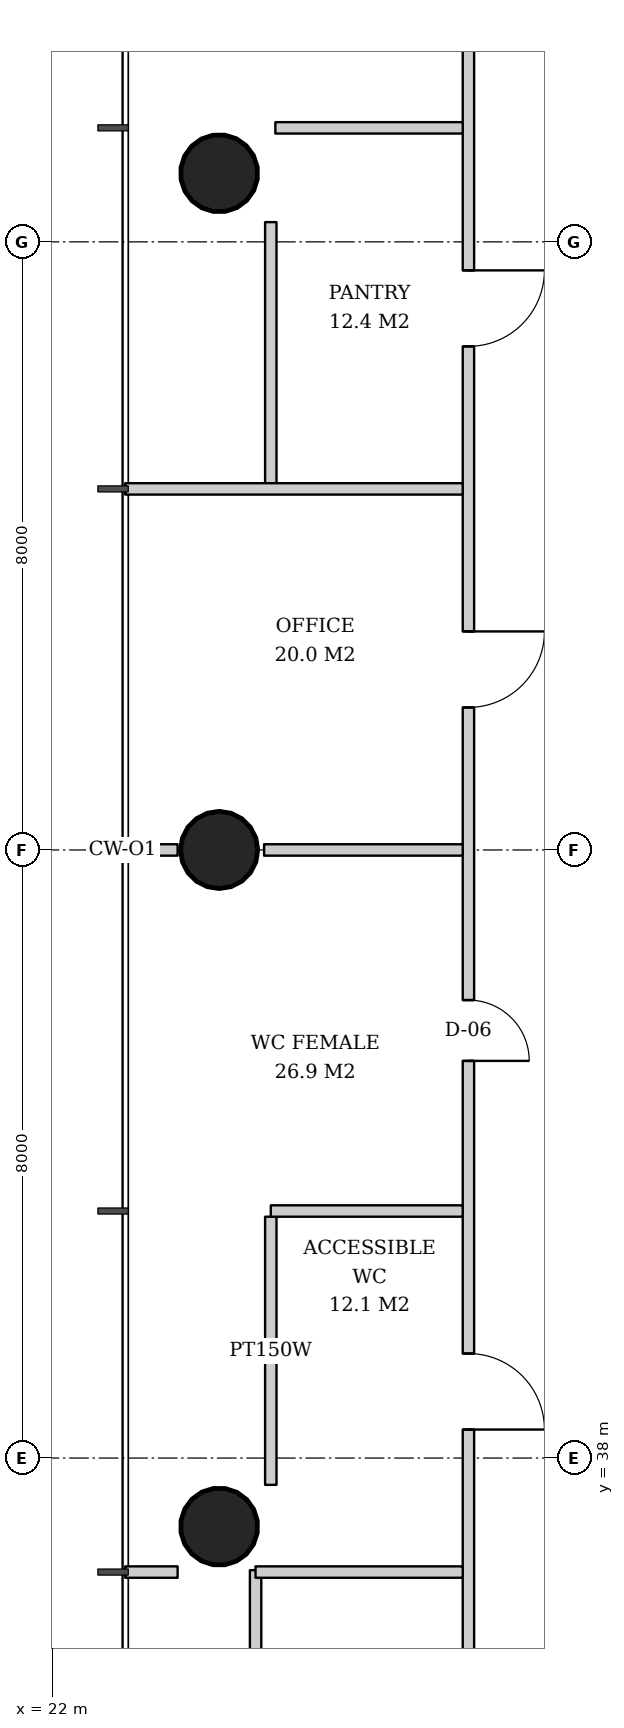
"""IFC4 building model, lengths in metres.
Left out: names, types, materials, properties, quantities, classifications, styles, units other than length and angle.
Written with IfcOpenShell. Run it as: python <this file> out.ifc"""

import sys

from ifc_helpers import new_model, si_unit, direction, frame, frame_2d, origin, origin_2d, place, context, subcontext, project, spatial, rectangle, hollow_circle, extrude, element, fill, save


model = new_model("IFC4")
c1 = context("Model", 3, precision=1e-05, world=origin(), true_north=direction((0.0, 1.0)))
c2 = subcontext(c1, "Body", "Model", "MODEL_VIEW")
j1 = project(units=[si_unit("LENGTHUNIT", "METRE"), si_unit("PLANEANGLEUNIT", "RADIAN")], contexts=[c1])
p1 = place(None, origin())
s1 = spatial("IfcSite", under=j1, at=p1, CompositionType="ELEMENT")
p2 = place(p1, origin())
s2 = spatial("IfcBuilding", under=s1, at=p2, CompositionType="ELEMENT")
p3 = place(p2, frame((0.0, 0.0, 119.8)))
s3 = spatial("IfcBuildingStorey", under=s2, at=p3, CompositionType="ELEMENT", Elevation=119.8)
p4 = place(p3, frame((24.157, 54.921, 0.0), z_axis=(0.031910269556, -0.015987237665, 0.999362868496), x_axis=(0.447933021895, 0.894067115991, 0.0)))
e1 = element("IfcColumn", 1, at=p4, inside=s3, PredefinedType="COLUMN", context=c2, shape_type="SweptSolid", body=[
    extrude(hollow_circle(Radius=0.508, WallThickness=0.04, at=origin_2d()), origin(), (0.0, 0.0, 1.0), 3.802),
])
p5 = place(p3, frame((24.157, 46.0, 0.0), z_axis=(0.031914348339, 0.0, 0.999490607445), x_axis=(0.0, 1.0, 0.0)))
e2 = element("IfcColumn", 2, at=p5, inside=s3, PredefinedType="COLUMN", context=c2, shape_type="SweptSolid", body=[
    extrude(hollow_circle(Radius=0.508, WallThickness=0.04, at=origin_2d()), origin(), (0.0, 0.0, 1.0), 3.802),
])
p6 = place(p3, frame((24.157, 37.079, 0.0), z_axis=(0.031910269556, 0.015987237665, 0.999362868496), x_axis=(-0.447933021895, 0.894067115991, 0.0)))
e3 = element("IfcColumn", 3, at=p6, inside=s3, PredefinedType="COLUMN", context=c2, shape_type="SweptSolid", body=[
    extrude(hollow_circle(Radius=0.508, WallThickness=0.04, at=origin_2d()), origin(), (0.0, 0.0, 1.0), 3.802),
])
p7 = place(p3, frame((24.875, 54.26, 0.0), z_axis=(0.0, 0.0, 1.0), x_axis=(0.0, -1.0, 0.0)))
e4 = element("IfcWall", 4, at=p7, inside=s3, PredefinedType="PARTITIONING", context=c2, shape_type="SweptSolid", body=[
    extrude(rectangle(XDim=3.435, YDim=0.15, at=frame_2d((1.717, 0.0))), origin(), (0.0, 0.0, 1.0), 3.62),
])
p8 = place(p3, frame((24.875, 41.175, 0.0), z_axis=(0.0, 0.0, 1.0), x_axis=(0.0, -1.0, 0.0)))
e5 = element("IfcWall", 5, at=p8, inside=s3, PredefinedType="PARTITIONING", context=c2, shape_type="SweptSolid", body=[
    extrude(rectangle(XDim=3.528, YDim=0.15, at=frame_2d((1.764, 0.0))), origin(), (0.0, 0.0, 1.0), 2.806),
])
p9 = place(p3, frame((24.675, 36.525, 0.0), z_axis=(0.0, 0.0, 1.0), x_axis=(0.0, -1.0, 0.0)))
e6 = element("IfcWall", 6, at=p9, inside=s3, PredefinedType="PARTITIONING", context=c2, shape_type="SweptSolid", body=[
    extrude(rectangle(XDim=4.7, YDim=0.15, at=frame_2d((2.35, 0.0))), origin(), (0.0, 0.0, 1.0), 2.806),
])
p10 = place(p3, frame((27.475, 61.612, 0.0), z_axis=(0.0, 0.0, 1.0), x_axis=(0.0, -1.0, 0.0)))
e7 = element("IfcWall", 7, at=p10, inside=s3, PredefinedType="PARTITIONING", context=c2, shape_type="SweptSolid", body=[
    extrude(rectangle(XDim=31.223, YDim=0.15, at=frame_2d((15.612, 0.0))), origin(), (0.0, 0.0, 1.0), 2.72),
])
p11 = place(p10, frame((3.237, 0.0, 0.0)))
e8 = element("IfcOpeningElement", 8, at=p11, cuts=e7, PredefinedType="OPENING", context=c2, shape_type="SweptSolid", body=[
    extrude(rectangle(XDim=1.0, YDim=2.1, at=frame_2d((0.5, 1.05))), frame((0.0, 0.085, 0.0), z_axis=(0.0, -1.0, 0.0), x_axis=(1.0, 0.0, 0.0)), (0.0, 0.0, 1.0), 0.17),
])
p12 = place(p10, frame((7.987, 0.0, 0.0)))
e9 = element("IfcOpeningElement", 9, at=p12, cuts=e7, PredefinedType="OPENING", context=c2, shape_type="SweptSolid", body=[
    extrude(rectangle(XDim=1.0, YDim=2.1, at=frame_2d((0.5, 1.05))), frame((0.0, 0.085, 0.0), z_axis=(0.0, -1.0, 0.0), x_axis=(1.0, 0.0, 0.0)), (0.0, 0.0, 1.0), 0.17),
])
p13 = place(p10, frame((12.737, 0.0, 0.0)))
e10 = element("IfcOpeningElement", 10, at=p13, cuts=e7, PredefinedType="OPENING", context=c2, shape_type="SweptSolid", body=[
    extrude(rectangle(XDim=1.0, YDim=2.1, at=frame_2d((0.5, 1.05))), frame((0.0, 0.085, 0.0), z_axis=(0.0, -1.0, 0.0), x_axis=(1.0, 0.0, 0.0)), (0.0, 0.0, 1.0), 0.17),
])
p14 = place(p10, frame((17.586, 0.0, 0.0)))
e11 = element("IfcOpeningElement", 11, at=p14, cuts=e7, PredefinedType="OPENING", context=c2, shape_type="SweptSolid", body=[
    extrude(rectangle(XDim=0.8, YDim=2.1, at=frame_2d((0.4, 1.05))), frame((0.0, 0.085, 0.0), z_axis=(0.0, -1.0, 0.0), x_axis=(1.0, 0.0, 0.0)), (0.0, 0.0, 1.0), 0.17),
])
p15 = place(p10, frame((22.237, 0.0, 0.0)))
e12 = element("IfcOpeningElement", 12, at=p15, cuts=e7, PredefinedType="OPENING", context=c2, shape_type="SweptSolid", body=[
    extrude(rectangle(XDim=1.0, YDim=2.1, at=frame_2d((0.5, 1.05))), frame((0.0, 0.085, 0.0), z_axis=(0.0, -1.0, 0.0), x_axis=(1.0, 0.0, 0.0)), (0.0, 0.0, 1.0), 0.17),
])
p16 = place(p10, frame((27.086, 0.0, 0.0)))
e13 = element("IfcOpeningElement", 13, at=p16, cuts=e7, PredefinedType="OPENING", context=c2, shape_type="SweptSolid", body=[
    extrude(rectangle(XDim=0.8, YDim=2.1, at=frame_2d((0.4, 1.05))), frame((0.0, 0.085, 0.0), z_axis=(0.0, -1.0, 0.0), x_axis=(1.0, 0.0, 0.0)), (0.0, 0.0, 1.0), 0.17),
])
p17 = place(p3, frame((27.4, 55.5, 0.0), z_axis=(0.0, 0.0, 1.0), x_axis=(-1.0, 0.0, 0.0)))
e14 = element("IfcWall", 14, at=p17, inside=s3, PredefinedType="PARTITIONING", context=c2, shape_type="SweptSolid", body=[
    extrude(rectangle(XDim=2.465, YDim=0.15, at=frame_2d((1.232, 0.0))), origin(), (0.0, 0.0, 1.0), 3.62),
])
p18 = place(p3, frame((27.4, 50.75, 0.0), z_axis=(0.0, 0.0, 1.0), x_axis=(-1.0, 0.0, 0.0)))
e15 = element("IfcWall", 15, at=p18, inside=s3, PredefinedType="PARTITIONING", context=c2, shape_type="SweptSolid", body=[
    extrude(rectangle(XDim=4.44, YDim=0.15, at=frame_2d((2.22, 0.0))), origin(), (0.0, 0.0, 1.0), 2.82),
])
p19 = place(p3, frame((27.4, 46.0, 0.0), z_axis=(0.0, 0.0, 1.0), x_axis=(-1.0, 0.0, 0.0)))
e16 = element("IfcWall", 16, at=p19, inside=s3, PredefinedType="PARTITIONING", context=c2, shape_type="SweptSolid", body=[
    extrude(rectangle(XDim=2.613, YDim=0.15, at=frame_2d((1.307, 0.0))), origin(), (0.0, 0.0, 1.0), 3.62),
])
p20 = place(p3, frame((23.649, 46.0, 0.0), z_axis=(0.0, 0.0, 1.0), x_axis=(-1.0, 0.0, 0.0)))
e17 = element("IfcWall", 17, at=p20, inside=s3, PredefinedType="PARTITIONING", context=c2, shape_type="SweptSolid", body=[
    extrude(rectangle(XDim=0.689, YDim=0.15, at=frame_2d((0.345, 0.0))), origin(), (0.0, 0.0, 1.0), 3.62),
])
p21 = place(p3, frame((27.4, 41.25, 0.0), z_axis=(0.0, 0.0, 1.0), x_axis=(-1.0, 0.0, 0.0)))
e18 = element("IfcWall", 18, at=p21, inside=s3, PredefinedType="PARTITIONING", context=c2, shape_type="SweptSolid", body=[
    extrude(rectangle(XDim=2.525, YDim=0.15, at=frame_2d((1.262, 0.0))), origin(), (0.0, 0.0, 1.0), 3.62),
])
p22 = place(p3, frame((27.4, 36.5, 0.0), z_axis=(0.0, 0.0, 1.0), x_axis=(-1.0, 0.0, 0.0)))
e19 = element("IfcWall", 19, at=p22, inside=s3, PredefinedType="PARTITIONING", context=c2, shape_type="SweptSolid", body=[
    extrude(rectangle(XDim=2.726, YDim=0.15, at=frame_2d((1.363, 0.0))), origin(), (0.0, 0.0, 1.0), 3.62),
])
p23 = place(p3, frame((23.649, 36.5, 0.0), z_axis=(0.0, 0.0, 1.0), x_axis=(-1.0, 0.0, 0.0)))
e20 = element("IfcWall", 20, at=p23, inside=s3, PredefinedType="PARTITIONING", context=c2, shape_type="SweptSolid", body=[
    extrude(rectangle(XDim=0.689, YDim=0.15, at=frame_2d((0.345, 0.0))), origin(), (0.0, 0.0, 1.0), 3.62),
])
p24 = place(p12, origin())
e21 = element("IfcDoor", 21, at=p24, inside=s3, OperationType="SINGLE_SWING_LEFT", PredefinedType="DOOR", context=c2, shape_type="SweptSolid", body=[
    extrude(rectangle(XDim=1.0, YDim=2.1, at=frame_2d((0.5, 1.05))), frame((0.0, 0.025, 0.0), z_axis=(0.0, -1.0, 0.0), x_axis=(1.0, 0.0, 0.0)), (0.0, 0.0, 1.0), 0.05),
])
fill(e9, e21)
p25 = place(p13, origin())
e22 = element("IfcDoor", 22, at=p25, inside=s3, OperationType="SINGLE_SWING_LEFT", PredefinedType="DOOR", context=c2, shape_type="SweptSolid", body=[
    extrude(rectangle(XDim=1.0, YDim=2.1, at=frame_2d((0.5, 1.05))), frame((0.0, 0.025, 0.0), z_axis=(0.0, -1.0, 0.0), x_axis=(1.0, 0.0, 0.0)), (0.0, 0.0, 1.0), 0.05),
])
fill(e10, e22)
p26 = place(p14, origin())
e23 = element("IfcDoor", 23, at=p26, inside=s3, OperationType="SINGLE_SWING_RIGHT", PredefinedType="DOOR", context=c2, shape_type="SweptSolid", body=[
    extrude(rectangle(XDim=0.8, YDim=2.1, at=frame_2d((0.4, 1.05))), frame((0.0, 0.025, 0.0), z_axis=(0.0, -1.0, 0.0), x_axis=(1.0, 0.0, 0.0)), (0.0, 0.0, 1.0), 0.05),
])
fill(e11, e23)
p27 = place(p15, origin())
e24 = element("IfcDoor", 24, at=p27, inside=s3, OperationType="SINGLE_SWING_RIGHT", PredefinedType="DOOR", context=c2, shape_type="SweptSolid", body=[
    extrude(rectangle(XDim=1.0, YDim=2.1, at=frame_2d((0.5, 1.05))), frame((0.0, 0.025, 0.0), z_axis=(0.0, -1.0, 0.0), x_axis=(1.0, 0.0, 0.0)), (0.0, 0.0, 1.0), 0.05),
])
fill(e12, e24)
save(model, sys.argv[1])
